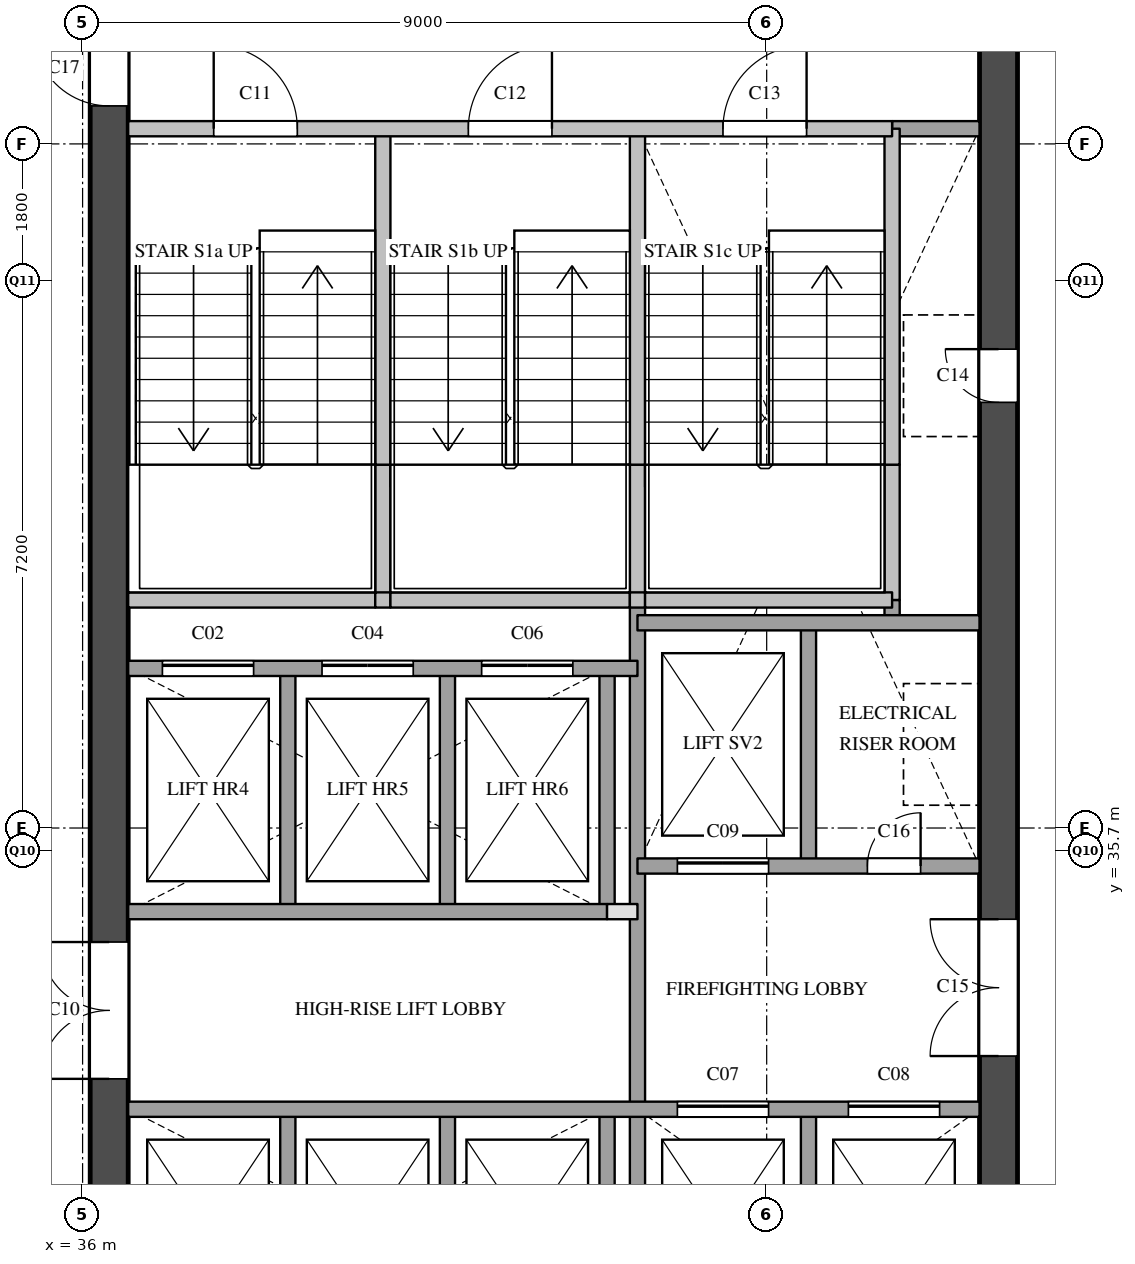
"""IFC4 building model, lengths in metres.
Left out: names, types, materials, properties, quantities, classifications, styles, units other than length and angle.
Written with IfcOpenShell. Run it as: python <this file> out.ifc"""

import sys

from ifc_helpers import new_model, si_unit, direction, frame, frame_2d, origin, place, context, subcontext, project, spatial, rectangle, extrude, element, fill, save


model = new_model("IFC4")
c1 = context("Model", 3, precision=1e-05, world=origin(), true_north=direction((0.0, 1.0)))
c2 = subcontext(c1, "Body", "Model", "MODEL_VIEW")
j1 = project(units=[si_unit("LENGTHUNIT", "METRE"), si_unit("PLANEANGLEUNIT", "RADIAN")], contexts=[c1])
p1 = place(None, origin())
s1 = spatial("IfcSite", under=j1, at=p1, CompositionType="ELEMENT")
p2 = place(p1, origin())
s2 = spatial("IfcBuilding", under=s1, at=p2, CompositionType="ELEMENT")
p3 = place(p2, frame((0.0, 0.0, 185.6)))
s3 = spatial("IfcBuildingStorey", under=s2, at=p3, CompositionType="ELEMENT", Elevation=185.6)
p4 = place(p3, frame((36.35, 29.1, 0.0), z_axis=(0.0, 0.0, 1.0), x_axis=(0.0, 1.0, 0.0)))
e1 = element("IfcWall", 1, at=p4, inside=s3, PredefinedType="SHEAR", context=c2, shape_type="SweptSolid", body=[
    extrude(rectangle(XDim=20.3, YDim=0.5, at=frame_2d((10.15, 0.0))), origin(), (0.0, 0.0, 1.0), 3.6),
])
p5 = place(p4, frame((3.6, 0.0, 0.0)))
e2 = element("IfcOpeningElement", 2, at=p5, cuts=e1, PredefinedType="OPENING", context=c2, shape_type="SweptSolid", body=[
    extrude(rectangle(XDim=1.8, YDim=2.1, at=frame_2d((0.9, 1.05))), frame((0.0, 0.26, 0.0), z_axis=(0.0, -1.0, 0.0), x_axis=(1.0, 0.0, 0.0)), (0.0, 0.0, 1.0), 0.52),
])
p6 = place(p4, frame((16.4, 0.0, 0.0)))
e3 = element("IfcOpeningElement", 3, at=p6, cuts=e1, PredefinedType="OPENING", context=c2, shape_type="SweptSolid", body=[
    extrude(rectangle(XDim=1.0, YDim=2.1, at=frame_2d((0.5, 1.05))), frame((0.0, 0.26, 0.0), z_axis=(0.0, -1.0, 0.0), x_axis=(1.0, 0.0, 0.0)), (0.0, 0.0, 1.0), 0.52),
])
p7 = place(p3, frame((48.05, 29.1, 0.0), z_axis=(0.0, 0.0, 1.0), x_axis=(0.0, 1.0, 0.0)))
e4 = element("IfcWall", 4, at=p7, inside=s3, PredefinedType="SHEAR", context=c2, shape_type="SweptSolid", body=[
    extrude(rectangle(XDim=20.3, YDim=0.5, at=frame_2d((10.15, 0.0))), origin(), (0.0, 0.0, 1.0), 3.6),
])
p8 = place(p7, frame((12.5, 0.0, 0.0)))
e5 = element("IfcOpeningElement", 5, at=p8, cuts=e4, PredefinedType="OPENING", context=c2, shape_type="SweptSolid", body=[
    extrude(rectangle(XDim=0.7, YDim=2.1, at=frame_2d((0.35, 1.05))), frame((0.0, 0.26, 0.0), z_axis=(0.0, -1.0, 0.0), x_axis=(1.0, 0.0, 0.0)), (0.0, 0.0, 1.0), 0.52),
])
p9 = place(p7, frame((3.9, 0.0, 0.0)))
e6 = element("IfcOpeningElement", 6, at=p9, cuts=e4, PredefinedType="OPENING", context=c2, shape_type="SweptSolid", body=[
    extrude(rectangle(XDim=1.8, YDim=2.1, at=frame_2d((0.9, 1.05))), frame((0.0, 0.26, 0.0), z_axis=(0.0, -1.0, 0.0), x_axis=(1.0, 0.0, 0.0)), (0.0, 0.0, 1.0), 0.52),
])
p10 = place(p3, frame((38.7, 29.1, 0.0), z_axis=(0.0, 0.0, 1.0), x_axis=(0.0, 1.0, 0.0)))
e7 = element("IfcWall", 7, at=p10, inside=s3, PredefinedType="SOLIDWALL", context=c2, shape_type="SweptSolid", body=[
    extrude(rectangle(XDim=3.2, YDim=0.2, at=frame_2d((1.6, 0.0))), origin(), (0.0, 0.0, 1.0), 3.6),
])
p11 = place(p3, frame((38.7, 34.9, 0.0), z_axis=(0.0, 0.0, 1.0), x_axis=(0.0, 1.0, 0.0)))
e8 = element("IfcWall", 8, at=p11, inside=s3, PredefinedType="SOLIDWALL", context=c2, shape_type="SweptSolid", body=[
    extrude(rectangle(XDim=3.2, YDim=0.2, at=frame_2d((1.6, 0.0))), origin(), (0.0, 0.0, 1.0), 3.6),
])
p12 = place(p3, frame((39.95, 39.0, 0.0), z_axis=(0.0, 0.0, 1.0), x_axis=(0.0, 1.0, 0.0)))
e9 = element("IfcWall", 9, at=p12, inside=s3, PredefinedType="SOLIDWALL", context=c2, shape_type="SweptSolid", body=[
    extrude(rectangle(XDim=1.78, YDim=0.2, at=frame_2d((0.89, 0.0))), origin(), (0.0, 0.0, 1.0), 3.6),
])
p13 = place(p3, frame((39.95, 40.78, 0.0), z_axis=(0.0, 0.0, 1.0), x_axis=(0.0, 1.0, 0.0)))
e10 = element("IfcWall", 10, at=p13, inside=s3, PredefinedType="SOLIDWALL", context=c2, shape_type="SweptSolid", body=[
    extrude(rectangle(XDim=4.42, YDim=0.2, at=frame_2d((2.21, 0.0))), origin(), (0.0, 0.0, 1.0), 3.6),
])
p14 = place(p3, frame((40.8, 29.1, 0.0), z_axis=(0.0, 0.0, 1.0), x_axis=(0.0, 1.0, 0.0)))
e11 = element("IfcWall", 11, at=p14, inside=s3, PredefinedType="SOLIDWALL", context=c2, shape_type="SweptSolid", body=[
    extrude(rectangle(XDim=3.2, YDim=0.2, at=frame_2d((1.6, 0.0))), origin(), (0.0, 0.0, 1.0), 3.6),
])
p15 = place(p3, frame((40.8, 34.9, 0.0), z_axis=(0.0, 0.0, 1.0), x_axis=(0.0, 1.0, 0.0)))
e12 = element("IfcWall", 12, at=p15, inside=s3, PredefinedType="SOLIDWALL", context=c2, shape_type="SweptSolid", body=[
    extrude(rectangle(XDim=3.2, YDim=0.2, at=frame_2d((1.6, 0.0))), origin(), (0.0, 0.0, 1.0), 3.6),
])
p16 = place(p3, frame((42.9, 29.1, 0.0), z_axis=(0.0, 0.0, 1.0), x_axis=(0.0, 1.0, 0.0)))
e13 = element("IfcWall", 13, at=p16, inside=s3, PredefinedType="SOLIDWALL", context=c2, shape_type="SweptSolid", body=[
    extrude(rectangle(XDim=3.2, YDim=0.2, at=frame_2d((1.6, 0.0))), origin(), (0.0, 0.0, 1.0), 3.6),
])
p17 = place(p3, frame((42.9, 34.9, 0.0), z_axis=(0.0, 0.0, 1.0), x_axis=(0.0, 1.0, 0.0)))
e14 = element("IfcWall", 14, at=p17, inside=s3, PredefinedType="SOLIDWALL", context=c2, shape_type="SweptSolid", body=[
    extrude(rectangle(XDim=3.2, YDim=0.2, at=frame_2d((1.6, 0.0))), origin(), (0.0, 0.0, 1.0), 3.6),
])
p18 = place(p3, frame((43.3, 29.1, 0.0), z_axis=(0.0, 0.0, 1.0), x_axis=(0.0, 1.0, 0.0)))
e15 = element("IfcWall", 15, at=p18, inside=s3, PredefinedType="SOLIDWALL", context=c2, shape_type="SweptSolid", body=[
    extrude(rectangle(XDim=9.9, YDim=0.2, at=frame_2d((4.95, 0.0))), origin(), (0.0, 0.0, 1.0), 3.6),
])
p19 = place(p3, frame((43.3, 39.0, 0.0), z_axis=(0.0, 0.0, 1.0), x_axis=(0.0, 1.0, 0.0)))
e16 = element("IfcWall", 16, at=p19, inside=s3, PredefinedType="SOLIDWALL", context=c2, shape_type="SweptSolid", body=[
    extrude(rectangle(XDim=1.78, YDim=0.2, at=frame_2d((0.89, 0.0))), origin(), (0.0, 0.0, 1.0), 3.6),
])
p20 = place(p3, frame((43.3, 40.78, 0.0), z_axis=(0.0, 0.0, 1.0), x_axis=(0.0, 1.0, 0.0)))
e17 = element("IfcWall", 17, at=p20, inside=s3, PredefinedType="SOLIDWALL", context=c2, shape_type="SweptSolid", body=[
    extrude(rectangle(XDim=4.42, YDim=0.2, at=frame_2d((2.21, 0.0))), origin(), (0.0, 0.0, 1.0), 3.6),
])
for number, where, z_axis, x_axis in (
    (18, (45.55, 29.1, 0.0), (0.0, 0.0, 1.0), (0.0, 1.0, 0.0)),
    (19, (45.55, 35.5, 0.0), (0.0, 0.0, 1.0), (0.0, 1.0, 0.0)),
):
    element("IfcWall", number, at=place(p3, frame(where, z_axis=z_axis, x_axis=x_axis)), inside=s3, PredefinedType="SOLIDWALL", context=c2, shape_type="SweptSolid", body=[
        extrude(rectangle(XDim=3.2, YDim=0.2, at=frame_2d((1.6, 0.0))), origin(), (0.0, 0.0, 1.0), 3.6),
    ])
p21 = place(p3, frame((46.65, 38.7, 0.0), z_axis=(0.0, 0.0, 1.0), x_axis=(0.0, 1.0, 0.0)))
e20 = element("IfcWall", 20, at=p21, inside=s3, PredefinedType="SOLIDWALL", context=c2, shape_type="SweptSolid", body=[
    extrude(rectangle(XDim=0.3, YDim=0.2, at=frame_2d((0.15, 0.0))), origin(), (0.0, 0.0, 1.0), 3.6),
])
p22 = place(p3, frame((46.65, 39.0, 0.0), z_axis=(0.0, 0.0, 1.0), x_axis=(0.0, 1.0, 0.0)))
e21 = element("IfcWall", 21, at=p22, inside=s3, PredefinedType="SOLIDWALL", context=c2, shape_type="SweptSolid", body=[
    extrude(rectangle(XDim=1.78, YDim=0.2, at=frame_2d((0.89, 0.0))), origin(), (0.0, 0.0, 1.0), 3.6),
])
p23 = place(p3, frame((46.65, 40.78, 0.0), z_axis=(0.0, 0.0, 1.0), x_axis=(0.0, 1.0, 0.0)))
e22 = element("IfcWall", 22, at=p23, inside=s3, PredefinedType="SOLIDWALL", context=c2, shape_type="SweptSolid", body=[
    extrude(rectangle(XDim=4.42, YDim=0.2, at=frame_2d((2.21, 0.0))), origin(), (0.0, 0.0, 1.0), 3.6),
])
p24 = place(p3, frame((36.6, 32.3, 0.0), z_axis=(0.0, 0.0, 1.0), x_axis=(1.0, 0.0, 0.0)))
e23 = element("IfcWall", 23, at=p24, inside=s3, PredefinedType="SOLIDWALL", context=c2, shape_type="SweptSolid", body=[
    extrude(rectangle(XDim=11.2, YDim=0.2, at=frame_2d((5.6, 0.0))), origin(), (0.0, 0.0, 1.0), 3.6),
])
p25 = place(p24, frame((7.225, 0.0, 0.0)))
e24 = element("IfcOpeningElement", 24, at=p25, cuts=e23, PredefinedType="OPENING", context=c2, shape_type="SweptSolid", body=[
    extrude(rectangle(XDim=1.2, YDim=2.1, at=frame_2d((0.6, 1.05))), frame((0.0, 0.11, 0.0), z_axis=(0.0, -1.0, 0.0), x_axis=(1.0, 0.0, 0.0)), (0.0, 0.0, 1.0), 0.22),
])
p26 = place(p24, frame((9.475, 0.0, 0.0)))
e25 = element("IfcOpeningElement", 25, at=p26, cuts=e23, PredefinedType="OPENING", context=c2, shape_type="SweptSolid", body=[
    extrude(rectangle(XDim=1.2, YDim=2.1, at=frame_2d((0.6, 1.05))), frame((0.0, 0.11, 0.0), z_axis=(0.0, -1.0, 0.0), x_axis=(1.0, 0.0, 0.0)), (0.0, 0.0, 1.0), 0.22),
])
p27 = place(p3, frame((42.9, 34.9, 0.0), z_axis=(0.0, 0.0, 1.0), x_axis=(1.0, 0.0, 0.0)))
e26 = element("IfcWall", 26, at=p27, inside=s3, PredefinedType="PARTITIONING", context=c2, shape_type="SweptSolid", body=[
    extrude(rectangle(XDim=0.4, YDim=0.2, at=frame_2d((0.2, 0.0))), origin(), (0.0, 0.0, 1.0), 3.6),
])
p28 = place(p3, frame((36.6, 34.9, 0.0), z_axis=(0.0, 0.0, 1.0), x_axis=(1.0, 0.0, 0.0)))
e27 = element("IfcWall", 27, at=p28, inside=s3, PredefinedType="SOLIDWALL", context=c2, shape_type="SweptSolid", body=[
    extrude(rectangle(XDim=6.3, YDim=0.2, at=frame_2d((3.15, 0.0))), origin(), (0.0, 0.0, 1.0), 3.6),
])
p29 = place(p3, frame((43.3, 35.5, 0.0), z_axis=(0.0, 0.0, 1.0), x_axis=(1.0, 0.0, 0.0)))
e28 = element("IfcWall", 28, at=p29, inside=s3, PredefinedType="SOLIDWALL", context=c2, shape_type="SweptSolid", body=[
    extrude(rectangle(XDim=4.5, YDim=0.2, at=frame_2d((2.25, 0.0))), origin(), (0.0, 0.0, 1.0), 3.6),
])
p30 = place(p29, frame((0.525, 0.0, 0.0)))
e29 = element("IfcOpeningElement", 29, at=p30, cuts=e28, PredefinedType="OPENING", context=c2, shape_type="SweptSolid", body=[
    extrude(rectangle(XDim=1.2, YDim=2.1, at=frame_2d((0.6, 1.05))), frame((0.0, 0.11, 0.0), z_axis=(0.0, -1.0, 0.0), x_axis=(1.0, 0.0, 0.0)), (0.0, 0.0, 1.0), 0.22),
])
p31 = place(p29, frame((3.025, 0.0, 0.0)))
e30 = element("IfcOpeningElement", 30, at=p31, cuts=e28, PredefinedType="OPENING", context=c2, shape_type="SweptSolid", body=[
    extrude(rectangle(XDim=0.7, YDim=2.1, at=frame_2d((0.35, 1.05))), frame((0.0, 0.11, 0.0), z_axis=(0.0, -1.0, 0.0), x_axis=(1.0, 0.0, 0.0)), (0.0, 0.0, 1.0), 0.22),
])
p32 = place(p3, frame((36.6, 38.1, 0.0), z_axis=(0.0, 0.0, 1.0), x_axis=(1.0, 0.0, 0.0)))
e31 = element("IfcWall", 31, at=p32, inside=s3, PredefinedType="SOLIDWALL", context=c2, shape_type="SweptSolid", body=[
    extrude(rectangle(XDim=6.7, YDim=0.2, at=frame_2d((3.35, 0.0))), origin(), (0.0, 0.0, 1.0), 3.6),
])
p33 = place(p32, frame((0.45, 0.0, 0.0)))
e32 = element("IfcOpeningElement", 32, at=p33, cuts=e31, PredefinedType="OPENING", context=c2, shape_type="SweptSolid", body=[
    extrude(rectangle(XDim=1.2, YDim=2.1, at=frame_2d((0.6, 1.05))), frame((0.0, 0.11, 0.0), z_axis=(0.0, -1.0, 0.0), x_axis=(1.0, 0.0, 0.0)), (0.0, 0.0, 1.0), 0.22),
])
p34 = place(p32, frame((2.55, 0.0, 0.0)))
e33 = element("IfcOpeningElement", 33, at=p34, cuts=e31, PredefinedType="OPENING", context=c2, shape_type="SweptSolid", body=[
    extrude(rectangle(XDim=1.2, YDim=2.1, at=frame_2d((0.6, 1.05))), frame((0.0, 0.11, 0.0), z_axis=(0.0, -1.0, 0.0), x_axis=(1.0, 0.0, 0.0)), (0.0, 0.0, 1.0), 0.22),
])
p35 = place(p32, frame((4.65, 0.0, 0.0)))
e34 = element("IfcOpeningElement", 34, at=p35, cuts=e31, PredefinedType="OPENING", context=c2, shape_type="SweptSolid", body=[
    extrude(rectangle(XDim=1.2, YDim=2.1, at=frame_2d((0.6, 1.05))), frame((0.0, 0.11, 0.0), z_axis=(0.0, -1.0, 0.0), x_axis=(1.0, 0.0, 0.0)), (0.0, 0.0, 1.0), 0.22),
])
p36 = place(p3, frame((43.3, 38.7, 0.0), z_axis=(0.0, 0.0, 1.0), x_axis=(1.0, 0.0, 0.0)))
e35 = element("IfcWall", 35, at=p36, inside=s3, PredefinedType="SOLIDWALL", context=c2, shape_type="SweptSolid", body=[
    extrude(rectangle(XDim=4.5, YDim=0.2, at=frame_2d((2.25, 0.0))), origin(), (0.0, 0.0, 1.0), 3.6),
])
p37 = place(p3, frame((36.6, 39.0, 0.0), z_axis=(0.0, 0.0, 1.0), x_axis=(1.0, 0.0, 0.0)))
e36 = element("IfcWall", 36, at=p37, inside=s3, PredefinedType="SOLIDWALL", context=c2, shape_type="SweptSolid", body=[
    extrude(rectangle(XDim=3.25, YDim=0.2, at=frame_2d((1.625, 0.0))), origin(), (0.0, 0.0, 1.0), 3.6),
])
p38 = place(p3, frame((39.85, 39.0, 0.0), z_axis=(0.0, 0.0, 1.0), x_axis=(1.0, 0.0, 0.0)))
e37 = element("IfcWall", 37, at=p38, inside=s3, PredefinedType="SOLIDWALL", context=c2, shape_type="SweptSolid", body=[
    extrude(rectangle(XDim=0.2, YDim=0.2, at=frame_2d((0.1, 0.0))), origin(), (0.0, 0.0, 1.0), 3.6),
])
p39 = place(p3, frame((40.05, 39.0, 0.0), z_axis=(0.0, 0.0, 1.0), x_axis=(1.0, 0.0, 0.0)))
e38 = element("IfcWall", 38, at=p39, inside=s3, PredefinedType="SOLIDWALL", context=c2, shape_type="SweptSolid", body=[
    extrude(rectangle(XDim=3.15, YDim=0.2, at=frame_2d((1.575, 0.0))), origin(), (0.0, 0.0, 1.0), 3.6),
])
p40 = place(p3, frame((43.2, 39.0, 0.0), z_axis=(0.0, 0.0, 1.0), x_axis=(1.0, 0.0, 0.0)))
e39 = element("IfcWall", 39, at=p40, inside=s3, PredefinedType="SOLIDWALL", context=c2, shape_type="SweptSolid", body=[
    extrude(rectangle(XDim=0.2, YDim=0.2, at=frame_2d((0.1, 0.0))), origin(), (0.0, 0.0, 1.0), 3.6),
])
p41 = place(p3, frame((43.4, 39.0, 0.0), z_axis=(0.0, 0.0, 1.0), x_axis=(1.0, 0.0, 0.0)))
e40 = element("IfcWall", 40, at=p41, inside=s3, PredefinedType="SOLIDWALL", context=c2, shape_type="SweptSolid", body=[
    extrude(rectangle(XDim=3.25, YDim=0.2, at=frame_2d((1.625, 0.0))), origin(), (0.0, 0.0, 1.0), 3.6),
])
p42 = place(p3, frame((46.65, 45.2, 0.0), z_axis=(0.0, 0.0, 1.0), x_axis=(1.0, 0.0, 0.0)))
e41 = element("IfcWall", 41, at=p42, inside=s3, PredefinedType="SOLIDWALL", context=c2, shape_type="SweptSolid", body=[
    extrude(rectangle(XDim=1.15, YDim=0.2, at=frame_2d((0.575, 0.0))), origin(), (0.0, 0.0, 1.0), 3.6),
])
p43 = place(p3, frame((36.6, 45.2, 0.0), z_axis=(0.0, 0.0, 1.0), x_axis=(1.0, 0.0, 0.0)))
e42 = element("IfcWall", 42, at=p43, inside=s3, PredefinedType="SOLIDWALL", context=c2, shape_type="SweptSolid", body=[
    extrude(rectangle(XDim=10.05, YDim=0.2, at=frame_2d((5.025, 0.0))), origin(), (0.0, 0.0, 1.0), 3.6),
])
p44 = place(p43, frame((1.125, 0.0, 0.0)))
e43 = element("IfcOpeningElement", 43, at=p44, cuts=e42, PredefinedType="OPENING", context=c2, shape_type="SweptSolid", body=[
    extrude(rectangle(XDim=1.1, YDim=2.1, at=frame_2d((0.55, 1.05))), frame((0.0, 0.11, 0.0), z_axis=(0.0, -1.0, 0.0), x_axis=(1.0, 0.0, 0.0)), (0.0, 0.0, 1.0), 0.22),
])
p45 = place(p43, frame((4.475, 0.0, 0.0)))
e44 = element("IfcOpeningElement", 44, at=p45, cuts=e42, PredefinedType="OPENING", context=c2, shape_type="SweptSolid", body=[
    extrude(rectangle(XDim=1.1, YDim=2.1, at=frame_2d((0.55, 1.05))), frame((0.0, 0.11, 0.0), z_axis=(0.0, -1.0, 0.0), x_axis=(1.0, 0.0, 0.0)), (0.0, 0.0, 1.0), 0.22),
])
p46 = place(p43, frame((7.825, 0.0, 0.0)))
e45 = element("IfcOpeningElement", 45, at=p46, cuts=e42, PredefinedType="OPENING", context=c2, shape_type="SweptSolid", body=[
    extrude(rectangle(XDim=1.1, YDim=2.1, at=frame_2d((0.55, 1.05))), frame((0.0, 0.11, 0.0), z_axis=(0.0, -1.0, 0.0), x_axis=(1.0, 0.0, 0.0)), (0.0, 0.0, 1.0), 0.22),
])
p47 = place(p33, origin())
e46 = element("IfcDoor", 46, at=p47, inside=s3, OperationType="SLIDING_TO_LEFT", PredefinedType="DOOR", context=c2, shape_type="SweptSolid", body=[
    extrude(rectangle(XDim=1.2, YDim=2.1, at=frame_2d((0.6, 1.05))), frame((0.0, 0.025, 0.0), z_axis=(0.0, -1.0, 0.0), x_axis=(1.0, 0.0, 0.0)), (0.0, 0.0, 1.0), 0.05),
])
fill(e32, e46)
p48 = place(p34, origin())
e47 = element("IfcDoor", 47, at=p48, inside=s3, OperationType="SLIDING_TO_LEFT", PredefinedType="DOOR", context=c2, shape_type="SweptSolid", body=[
    extrude(rectangle(XDim=1.2, YDim=2.1, at=frame_2d((0.6, 1.05))), frame((0.0, 0.025, 0.0), z_axis=(0.0, -1.0, 0.0), x_axis=(1.0, 0.0, 0.0)), (0.0, 0.0, 1.0), 0.05),
])
fill(e33, e47)
p49 = place(p35, origin())
e48 = element("IfcDoor", 48, at=p49, inside=s3, OperationType="SLIDING_TO_LEFT", PredefinedType="DOOR", context=c2, shape_type="SweptSolid", body=[
    extrude(rectangle(XDim=1.2, YDim=2.1, at=frame_2d((0.6, 1.05))), frame((0.0, 0.025, 0.0), z_axis=(0.0, -1.0, 0.0), x_axis=(1.0, 0.0, 0.0)), (0.0, 0.0, 1.0), 0.05),
])
fill(e34, e48)
p50 = place(p25, origin())
e49 = element("IfcDoor", 49, at=p50, inside=s3, OperationType="SLIDING_TO_LEFT", PredefinedType="DOOR", context=c2, shape_type="SweptSolid", body=[
    extrude(rectangle(XDim=1.2, YDim=2.1, at=frame_2d((0.6, 1.05))), frame((0.0, 0.025, 0.0), z_axis=(0.0, -1.0, 0.0), x_axis=(1.0, 0.0, 0.0)), (0.0, 0.0, 1.0), 0.05),
])
fill(e24, e49)
p51 = place(p26, origin())
e50 = element("IfcDoor", 50, at=p51, inside=s3, OperationType="SLIDING_TO_LEFT", PredefinedType="DOOR", context=c2, shape_type="SweptSolid", body=[
    extrude(rectangle(XDim=1.2, YDim=2.1, at=frame_2d((0.6, 1.05))), frame((0.0, 0.025, 0.0), z_axis=(0.0, -1.0, 0.0), x_axis=(1.0, 0.0, 0.0)), (0.0, 0.0, 1.0), 0.05),
])
fill(e25, e50)
p52 = place(p30, origin())
e51 = element("IfcDoor", 51, at=p52, inside=s3, OperationType="SLIDING_TO_LEFT", PredefinedType="DOOR", context=c2, shape_type="SweptSolid", body=[
    extrude(rectangle(XDim=1.2, YDim=2.1, at=frame_2d((0.6, 1.05))), frame((0.0, 0.025, 0.0), z_axis=(0.0, -1.0, 0.0), x_axis=(1.0, 0.0, 0.0)), (0.0, 0.0, 1.0), 0.05),
])
fill(e29, e51)
p53 = place(p5, origin())
e52 = element("IfcDoor", 52, at=p53, inside=s3, OperationType="DOUBLE_DOOR_SINGLE_SWING", PredefinedType="DOOR", context=c2, shape_type="SweptSolid", body=[
    extrude(rectangle(XDim=1.8, YDim=2.1, at=frame_2d((0.9, 1.05))), frame((0.0, 0.025, 0.0), z_axis=(0.0, -1.0, 0.0), x_axis=(1.0, 0.0, 0.0)), (0.0, 0.0, 1.0), 0.05),
])
fill(e2, e52)
p54 = place(p44, origin())
e53 = element("IfcDoor", 53, at=p54, inside=s3, OperationType="SINGLE_SWING_LEFT", PredefinedType="DOOR", context=c2, shape_type="SweptSolid", body=[
    extrude(rectangle(XDim=1.1, YDim=2.1, at=frame_2d((0.55, 1.05))), frame((0.0, 0.025, 0.0), z_axis=(0.0, -1.0, 0.0), x_axis=(1.0, 0.0, 0.0)), (0.0, 0.0, 1.0), 0.05),
])
fill(e43, e53)
p55 = place(p45, origin())
e54 = element("IfcDoor", 54, at=p55, inside=s3, OperationType="SINGLE_SWING_RIGHT", PredefinedType="DOOR", context=c2, shape_type="SweptSolid", body=[
    extrude(rectangle(XDim=1.1, YDim=2.1, at=frame_2d((0.55, 1.05))), frame((0.0, 0.025, 0.0), z_axis=(0.0, -1.0, 0.0), x_axis=(1.0, 0.0, 0.0)), (0.0, 0.0, 1.0), 0.05),
])
fill(e44, e54)
p56 = place(p46, origin())
e55 = element("IfcDoor", 55, at=p56, inside=s3, OperationType="SINGLE_SWING_RIGHT", PredefinedType="DOOR", context=c2, shape_type="SweptSolid", body=[
    extrude(rectangle(XDim=1.1, YDim=2.1, at=frame_2d((0.55, 1.05))), frame((0.0, 0.025, 0.0), z_axis=(0.0, -1.0, 0.0), x_axis=(1.0, 0.0, 0.0)), (0.0, 0.0, 1.0), 0.05),
])
fill(e45, e55)
p57 = place(p8, origin())
e56 = element("IfcDoor", 56, at=p57, inside=s3, OperationType="SINGLE_SWING_RIGHT", PredefinedType="DOOR", context=c2, shape_type="SweptSolid", body=[
    extrude(rectangle(XDim=0.7, YDim=2.1, at=frame_2d((0.35, 1.05))), frame((0.0, 0.025, 0.0), z_axis=(0.0, -1.0, 0.0), x_axis=(1.0, 0.0, 0.0)), (0.0, 0.0, 1.0), 0.05),
])
fill(e5, e56)
p58 = place(p9, origin())
e57 = element("IfcDoor", 57, at=p58, inside=s3, OperationType="DOUBLE_DOOR_SINGLE_SWING", PredefinedType="DOOR", context=c2, shape_type="SweptSolid", body=[
    extrude(rectangle(XDim=1.8, YDim=2.1, at=frame_2d((0.9, 1.05))), frame((0.0, 0.025, 0.0), z_axis=(0.0, -1.0, 0.0), x_axis=(1.0, 0.0, 0.0)), (0.0, 0.0, 1.0), 0.05),
])
fill(e6, e57)
p59 = place(p31, origin())
e58 = element("IfcDoor", 58, at=p59, inside=s3, OperationType="SINGLE_SWING_RIGHT", PredefinedType="DOOR", context=c2, shape_type="SweptSolid", body=[
    extrude(rectangle(XDim=0.7, YDim=2.1, at=frame_2d((0.35, 1.05))), frame((0.0, 0.025, 0.0), z_axis=(0.0, -1.0, 0.0), x_axis=(1.0, 0.0, 0.0)), (0.0, 0.0, 1.0), 0.05),
])
fill(e30, e58)
p60 = place(p6, origin())
e59 = element("IfcDoor", 59, at=p60, inside=s3, OperationType="SINGLE_SWING_RIGHT", PredefinedType="DOOR", context=c2, shape_type="SweptSolid", body=[
    extrude(rectangle(XDim=1.0, YDim=2.1, at=frame_2d((0.5, 1.05))), frame((0.0, 0.025, 0.0), z_axis=(0.0, -1.0, 0.0), x_axis=(1.0, 0.0, 0.0)), (0.0, 0.0, 1.0), 0.05),
])
fill(e3, e59)
save(model, sys.argv[1])
